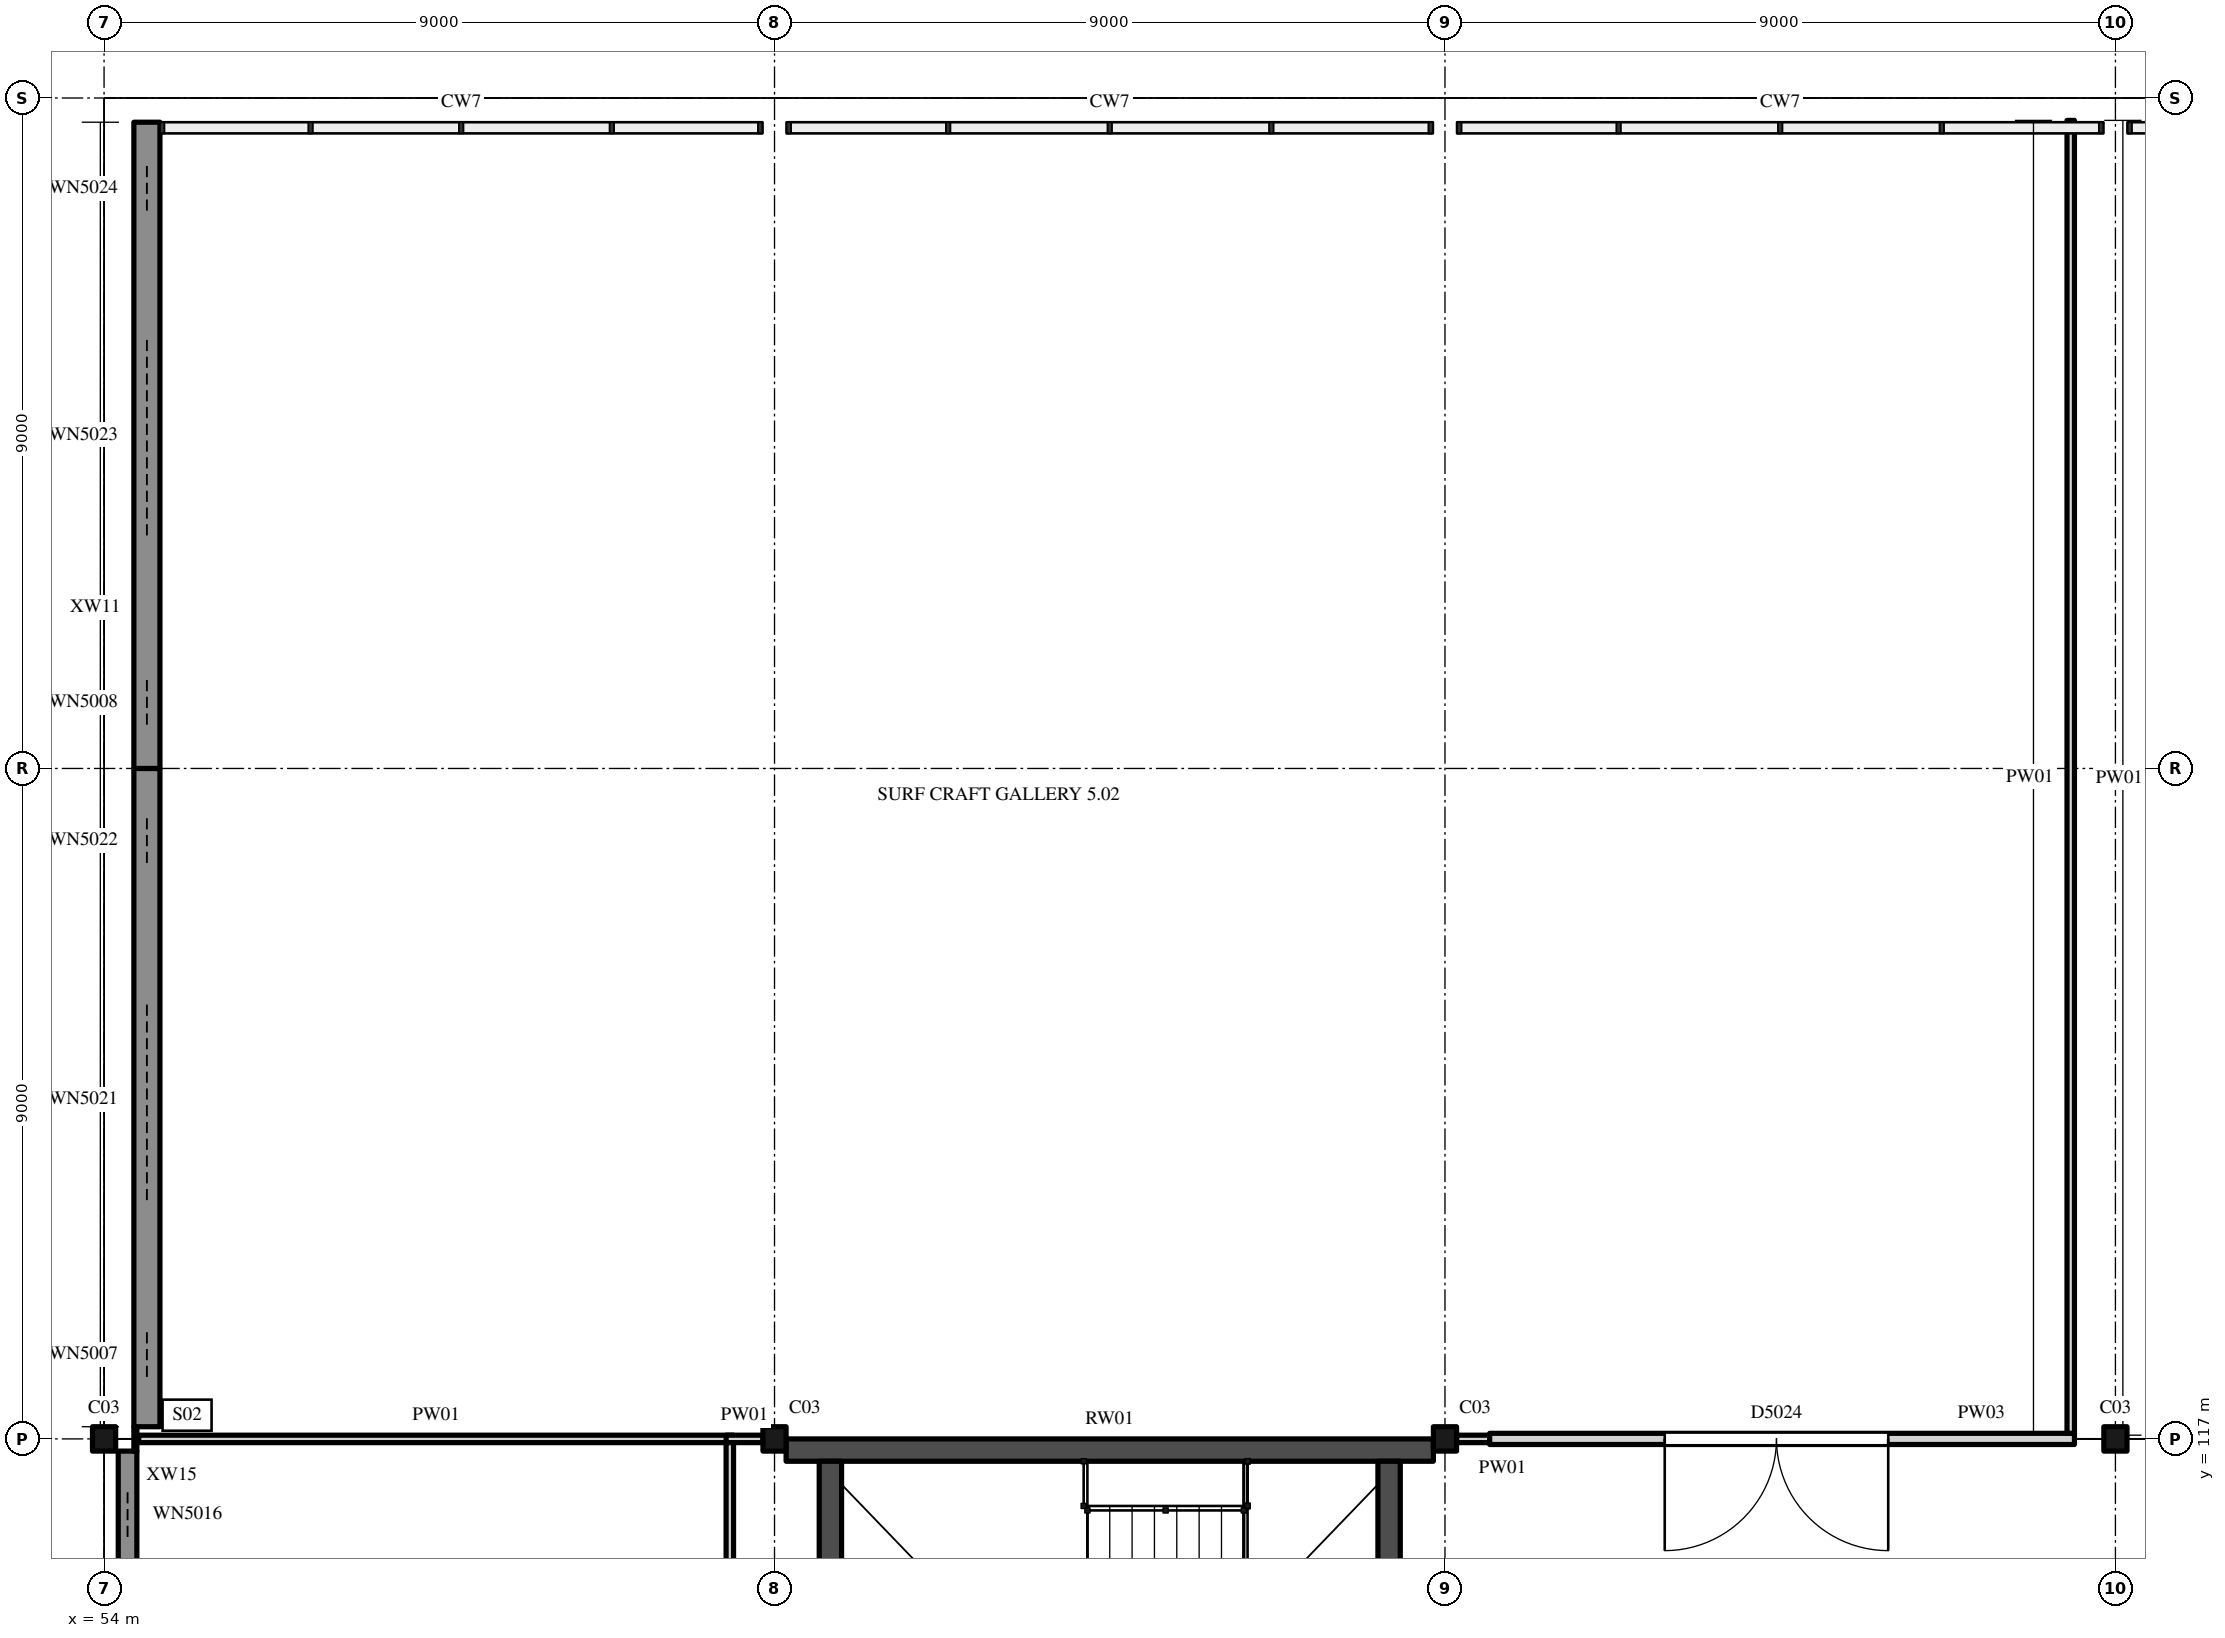
"""IFC4 building model, lengths in metres.
Left out: names, types, materials, properties, quantities, classifications, styles, units other than length and angle.
Written with IfcOpenShell. Run it as: python <this file> out.ifc"""

import sys

from ifc_helpers import new_model, si_unit, direction, frame, frame_2d, origin, origin_2d, place, context, subcontext, project, spatial, rectangle, i_section, extrude, element, fill, save


model = new_model("IFC4")
c1 = context("Model", 3, precision=1e-05, world=origin(), true_north=direction((0.0, 1.0)))
c2 = subcontext(c1, "Body", "Model", "MODEL_VIEW")
j1 = project(units=[si_unit("LENGTHUNIT", "METRE"), si_unit("PLANEANGLEUNIT", "RADIAN")], contexts=[c1])
p1 = place(None, origin())
s1 = spatial("IfcSite", under=j1, at=p1, CompositionType="ELEMENT")
p2 = place(p1, origin())
s2 = spatial("IfcBuilding", under=s1, at=p2, CompositionType="ELEMENT")
p3 = place(p2, frame((0.0, 0.0, 31.0)))
s3 = spatial("IfcBuildingStorey", under=s2, at=p3, CompositionType="ELEMENT", Elevation=31.0)
for number, where, z_axis, x_axis in (
    (1, (54.0, 117.0, 0.0), (0.0, 0.0, 1.0), (1.0, 0.0, 0.0)),
    (2, (63.0, 117.0, 0.0), (0.0, 0.0, 1.0), (1.0, 0.0, 0.0)),
    (3, (72.0, 117.0, 0.0), (0.0, 0.0, 1.0), (1.0, 0.0, 0.0)),
    (4, (81.0, 117.0, 0.0), (0.0, 0.0, 1.0), (1.0, 0.0, 0.0)),
):
    element("IfcColumn", number, at=place(p3, frame(where, z_axis=z_axis, x_axis=x_axis)), inside=s3, PredefinedType="COLUMN", context=c2, shape_type="SweptSolid", body=[
        extrude(i_section(OverallWidth=0.311, OverallDepth=0.327, WebThickness=0.016, FlangeThickness=0.025, FilletRadius=0.017, at=origin_2d()), origin(), (0.0, 0.0, 1.0), 5.0),
    ])
p4 = place(p3, frame((63.156, 116.85, 0.0), z_axis=(0.0, 0.0, 1.0), x_axis=(1.0, 0.0, 0.0)))
e5 = element("IfcWall", 5, at=p4, inside=s3, PredefinedType="SHEAR", context=c2, shape_type="SweptSolid", body=[
    extrude(rectangle(XDim=8.689, YDim=0.3, at=frame_2d((4.344, 0.0))), origin(), (0.0, 0.0, 1.0), 5.0),
])
p5 = place(p3, frame((63.75, 108.9, 0.0), z_axis=(0.0, 0.0, 1.0), x_axis=(0.0, 1.0, 0.0)))
e6 = element("IfcWall", 6, at=p5, inside=s3, PredefinedType="SHEAR", context=c2, shape_type="SweptSolid", body=[
    extrude(rectangle(XDim=7.8, YDim=0.3, at=frame_2d((3.9, 0.0))), origin(), (0.0, 0.0, 1.0), 5.0),
])
p6 = place(p3, frame((71.25, 108.9, 0.0), z_axis=(0.0, 0.0, 1.0), x_axis=(0.0, 1.0, 0.0)))
e7 = element("IfcWall", 7, at=p6, inside=s3, PredefinedType="SHEAR", context=c2, shape_type="SweptSolid", body=[
    extrude(rectangle(XDim=7.8, YDim=0.3, at=frame_2d((3.9, 0.0))), origin(), (0.0, 0.0, 1.0), 5.0),
])
p7 = place(p6, frame((4.1, 0.0, 0.0)))
e8 = element("IfcOpeningElement", 8, at=p7, cuts=e7, PredefinedType="OPENING", context=c2, shape_type="SweptSolid", body=[
    extrude(rectangle(XDim=1.2, YDim=2.1, at=frame_2d((0.6, 1.05))), frame((0.0, 0.16, 0.0), z_axis=(0.0, -1.0, 0.0), x_axis=(1.0, 0.0, 0.0)), (0.0, 0.0, 1.0), 0.32),
])
p8 = place(p3, frame((54.315, 108.161, 0.0), z_axis=(0.0, 0.0, 1.0), x_axis=(0.0, 1.0, 0.0)))
e9 = element("IfcWall", 9, at=p8, inside=s3, PredefinedType="SOLIDWALL", context=c2, shape_type="SweptSolid", body=[
    extrude(rectangle(XDim=8.676, YDim=0.25, at=frame_2d((4.338, 0.0))), origin(), (0.0, 0.0, 1.0), 4.504),
])
p9 = place(p8, frame((0.623, 0.0, 1.6)))
e10 = element("IfcOpeningElement", 10, at=p9, cuts=e9, PredefinedType="OPENING", context=c2, shape_type="SweptSolid", body=[
    extrude(rectangle(XDim=0.6, YDim=1.2, at=frame_2d((0.3, 0.6))), frame((0.0, 0.135, 0.0), z_axis=(0.0, -1.0, 0.0), x_axis=(1.0, 0.0, 0.0)), (0.0, 0.0, 1.0), 0.27),
])
p10 = place(p8, frame((3.017, 0.0, 1.6)))
e11 = element("IfcOpeningElement", 11, at=p10, cuts=e9, PredefinedType="OPENING", context=c2, shape_type="SweptSolid", body=[
    extrude(rectangle(XDim=2.7, YDim=1.2, at=frame_2d((1.35, 0.6))), frame((0.0, 0.135, 0.0), z_axis=(0.0, -1.0, 0.0), x_axis=(1.0, 0.0, 0.0)), (0.0, 0.0, 1.0), 0.27),
])
p11 = place(p8, frame((7.523, 0.0, 1.6)))
e12 = element("IfcOpeningElement", 12, at=p11, cuts=e9, PredefinedType="OPENING", context=c2, shape_type="SweptSolid", body=[
    extrude(rectangle(XDim=0.6, YDim=1.2, at=frame_2d((0.3, 0.6))), frame((0.0, 0.135, 0.0), z_axis=(0.0, -1.0, 0.0), x_axis=(1.0, 0.0, 0.0)), (0.0, 0.0, 1.0), 0.27),
])
p12 = place(p3, frame((54.575, 117.164, 0.0), z_axis=(0.0, 0.0, 1.0), x_axis=(0.0, 1.0, 0.0)))
e13 = element("IfcWall", 13, at=p12, inside=s3, PredefinedType="SOLIDWALL", context=c2, shape_type="SweptSolid", body=[
    extrude(rectangle(XDim=8.836, YDim=0.35, at=frame_2d((4.418, 0.0))), origin(), (0.0, 0.0, 1.0), 4.825),
])
p13 = place(p12, frame((0.668, 0.0, 1.6)))
e14 = element("IfcOpeningElement", 14, at=p13, cuts=e13, PredefinedType="OPENING", context=c2, shape_type="SweptSolid", body=[
    extrude(rectangle(XDim=0.6, YDim=1.2, at=frame_2d((0.3, 0.6))), frame((0.0, 0.185, 0.0), z_axis=(0.0, -1.0, 0.0), x_axis=(1.0, 0.0, 0.0)), (0.0, 0.0, 1.0), 0.37),
])
p14 = place(p12, frame((3.042, 0.0, 1.6)))
e15 = element("IfcOpeningElement", 15, at=p14, cuts=e13, PredefinedType="OPENING", context=c2, shape_type="SweptSolid", body=[
    extrude(rectangle(XDim=2.7, YDim=1.2, at=frame_2d((1.35, 0.6))), frame((0.0, 0.185, 0.0), z_axis=(0.0, -1.0, 0.0), x_axis=(1.0, 0.0, 0.0)), (0.0, 0.0, 1.0), 0.37),
])
p15 = place(p12, frame((7.568, 0.0, 1.6)))
e16 = element("IfcOpeningElement", 16, at=p15, cuts=e13, PredefinedType="OPENING", context=c2, shape_type="SweptSolid", body=[
    extrude(rectangle(XDim=0.6, YDim=1.2, at=frame_2d((0.3, 0.6))), frame((0.0, 0.185, 0.0), z_axis=(0.0, -1.0, 0.0), x_axis=(1.0, 0.0, 0.0)), (0.0, 0.0, 1.0), 0.37),
])
p16 = place(p3, frame((54.575, 126.0, 0.0), z_axis=(0.0, 0.0, 1.0), x_axis=(0.0, 1.0, 0.0)))
e17 = element("IfcWall", 17, at=p16, inside=s3, PredefinedType="SOLIDWALL", context=c2, shape_type="SweptSolid", body=[
    extrude(rectangle(XDim=8.675, YDim=0.35, at=frame_2d((4.337, 0.0))), origin(), (0.0, 0.0, 1.0), 4.825),
])
p17 = place(p16, frame((0.587, 0.0, 1.6)))
e18 = element("IfcOpeningElement", 18, at=p17, cuts=e17, PredefinedType="OPENING", context=c2, shape_type="SweptSolid", body=[
    extrude(rectangle(XDim=0.6, YDim=1.2, at=frame_2d((0.3, 0.6))), frame((0.0, 0.185, 0.0), z_axis=(0.0, -1.0, 0.0), x_axis=(1.0, 0.0, 0.0)), (0.0, 0.0, 1.0), 0.37),
])
p18 = place(p16, frame((3.128, 0.0, 1.6)))
e19 = element("IfcOpeningElement", 19, at=p18, cuts=e17, PredefinedType="OPENING", context=c2, shape_type="SweptSolid", body=[
    extrude(rectangle(XDim=2.7, YDim=1.2, at=frame_2d((1.35, 0.6))), frame((0.0, 0.185, 0.0), z_axis=(0.0, -1.0, 0.0), x_axis=(1.0, 0.0, 0.0)), (0.0, 0.0, 1.0), 0.37),
])
p19 = place(p16, frame((7.488, 0.0, 1.6)))
e20 = element("IfcOpeningElement", 20, at=p19, cuts=e17, PredefinedType="OPENING", context=c2, shape_type="SweptSolid", body=[
    extrude(rectangle(XDim=0.6, YDim=1.2, at=frame_2d((0.3, 0.6))), frame((0.0, 0.185, 0.0), z_axis=(0.0, -1.0, 0.0), x_axis=(1.0, 0.0, 0.0)), (0.0, 0.0, 1.0), 0.37),
])
p20 = place(p3, frame((54.42, 116.836, 0.0), z_axis=(0.0, 0.0, 1.0), x_axis=(0.0, 1.0, 0.0)))
e21 = element("IfcWall", 21, at=p20, inside=s3, PredefinedType="SOLIDWALL", context=c2, shape_type="SweptSolid", body=[
    extrude(rectangle(XDim=0.327, YDim=0.04, at=frame_2d((0.164, 0.0))), origin(), (0.0, 0.0, 1.0), 4.825),
])
p21 = place(p3, frame((54.465, 117.0, 0.0), z_axis=(0.0, 0.0, 1.0), x_axis=(1.0, 0.0, 0.0)))
e22 = element("IfcWall", 22, at=p21, inside=s3, PredefinedType="PARTITIONING", context=c2, shape_type="SweptSolid", body=[
    extrude(rectangle(XDim=7.985, YDim=0.1, at=frame_2d((3.992, 0.0))), origin(), (0.0, 0.0, 1.0), 4.518),
])
p22 = place(p3, frame((62.351, 117.0, 0.0), z_axis=(0.0, 0.0, 1.0), x_axis=(1.0, 0.0, 0.0)))
e23 = element("IfcWall", 23, at=p22, inside=s3, PredefinedType="PARTITIONING", context=c2, shape_type="SweptSolid", body=[
    extrude(rectangle(XDim=0.494, YDim=0.1, at=frame_2d((0.247, 0.0))), origin(), (0.0, 0.0, 1.0), 4.825),
])
p23 = place(p3, frame((72.156, 117.0, 0.0), z_axis=(0.0, 0.0, 1.0), x_axis=(1.0, 0.0, 0.0)))
e24 = element("IfcWall", 24, at=p23, inside=s3, PredefinedType="PARTITIONING", context=c2, shape_type="SweptSolid", body=[
    extrude(rectangle(XDim=0.444, YDim=0.1, at=frame_2d((0.222, 0.0))), origin(), (0.0, 0.0, 1.0), 4.825),
])
p24 = place(p3, frame((72.6, 117.0, 0.0), z_axis=(0.0, 0.0, 1.0), x_axis=(1.0, 0.0, 0.0)))
e25 = element("IfcWall", 25, at=p24, inside=s3, PredefinedType="PARTITIONING", context=c2, shape_type="SweptSolid", body=[
    extrude(rectangle(XDim=7.85, YDim=0.15, at=frame_2d((3.925, 0.0))), origin(), (0.0, 0.0, 1.0), 4.518),
])
p25 = place(p24, frame((2.35, 0.0, 0.0)))
e26 = element("IfcOpeningElement", 26, at=p25, cuts=e25, PredefinedType="OPENING", context=c2, shape_type="SweptSolid", body=[
    extrude(rectangle(XDim=3.0, YDim=3.0, at=frame_2d((1.5, 1.5))), frame((0.0, 0.085, 0.0), z_axis=(0.0, -1.0, 0.0), x_axis=(1.0, 0.0, 0.0)), (0.0, 0.0, 1.0), 0.17),
])
p26 = place(p3, frame((62.4, 108.062, 0.0), z_axis=(0.0, 0.0, 1.0), x_axis=(0.0, 1.0, 0.0)))
e27 = element("IfcWall", 27, at=p26, inside=s3, PredefinedType="PARTITIONING", context=c2, shape_type="SweptSolid", body=[
    extrude(rectangle(XDim=8.887, YDim=0.1, at=frame_2d((4.444, 0.0))), origin(), (0.0, 0.0, 1.0), 4.825),
])
p27 = place(p3, frame((80.4, 117.075, 0.0), z_axis=(0.0, 0.0, 1.0), x_axis=(0.0, 1.0, 0.0)))
e28 = element("IfcWall", 28, at=p27, inside=s3, PredefinedType="PARTITIONING", context=c2, shape_type="SweptSolid", body=[
    extrude(rectangle(XDim=17.625, YDim=0.1, at=frame_2d((8.812, 0.0))), origin(), (0.0, 0.0, 1.0), 4.825),
])
p28 = place(p11, origin())
e29 = element("IfcWindow", 29, at=p28, inside=s3, PartitioningType="SINGLE_PANEL", PredefinedType="WINDOW", context=c2, shape_type="SweptSolid", body=[
    extrude(rectangle(XDim=0.6, YDim=1.2, at=frame_2d((0.3, 0.6))), frame((0.0, 0.03, 0.0), z_axis=(0.0, -1.0, 0.0), x_axis=(1.0, 0.0, 0.0)), (0.0, 0.0, 1.0), 0.06),
])
fill(e12, e29)
p29 = place(p13, origin())
e30 = element("IfcWindow", 30, at=p29, inside=s3, PartitioningType="SINGLE_PANEL", PredefinedType="WINDOW", context=c2, shape_type="SweptSolid", body=[
    extrude(rectangle(XDim=0.6, YDim=1.2, at=frame_2d((0.3, 0.6))), frame((0.0, 0.03, 0.0), z_axis=(0.0, -1.0, 0.0), x_axis=(1.0, 0.0, 0.0)), (0.0, 0.0, 1.0), 0.06),
])
fill(e14, e30)
p30 = place(p14, origin())
e31 = element("IfcWindow", 31, at=p30, inside=s3, PartitioningType="SINGLE_PANEL", PredefinedType="WINDOW", context=c2, shape_type="SweptSolid", body=[
    extrude(rectangle(XDim=2.7, YDim=1.2, at=frame_2d((1.35, 0.6))), frame((0.0, 0.03, 0.0), z_axis=(0.0, -1.0, 0.0), x_axis=(1.0, 0.0, 0.0)), (0.0, 0.0, 1.0), 0.06),
])
fill(e15, e31)
p31 = place(p15, origin())
e32 = element("IfcWindow", 32, at=p31, inside=s3, PartitioningType="SINGLE_PANEL", PredefinedType="WINDOW", context=c2, shape_type="SweptSolid", body=[
    extrude(rectangle(XDim=0.6, YDim=1.2, at=frame_2d((0.3, 0.6))), frame((0.0, 0.03, 0.0), z_axis=(0.0, -1.0, 0.0), x_axis=(1.0, 0.0, 0.0)), (0.0, 0.0, 1.0), 0.06),
])
fill(e16, e32)
p32 = place(p17, origin())
e33 = element("IfcWindow", 33, at=p32, inside=s3, PartitioningType="SINGLE_PANEL", PredefinedType="WINDOW", context=c2, shape_type="SweptSolid", body=[
    extrude(rectangle(XDim=0.6, YDim=1.2, at=frame_2d((0.3, 0.6))), frame((0.0, 0.03, 0.0), z_axis=(0.0, -1.0, 0.0), x_axis=(1.0, 0.0, 0.0)), (0.0, 0.0, 1.0), 0.06),
])
fill(e18, e33)
p33 = place(p18, origin())
e34 = element("IfcWindow", 34, at=p33, inside=s3, PartitioningType="SINGLE_PANEL", PredefinedType="WINDOW", context=c2, shape_type="SweptSolid", body=[
    extrude(rectangle(XDim=2.7, YDim=1.2, at=frame_2d((1.35, 0.6))), frame((0.0, 0.03, 0.0), z_axis=(0.0, -1.0, 0.0), x_axis=(1.0, 0.0, 0.0)), (0.0, 0.0, 1.0), 0.06),
])
fill(e19, e34)
p34 = place(p19, origin())
e35 = element("IfcWindow", 35, at=p34, inside=s3, PartitioningType="SINGLE_PANEL", PredefinedType="WINDOW", context=c2, shape_type="SweptSolid", body=[
    extrude(rectangle(XDim=0.6, YDim=1.2, at=frame_2d((0.3, 0.6))), frame((0.0, 0.03, 0.0), z_axis=(0.0, -1.0, 0.0), x_axis=(1.0, 0.0, 0.0)), (0.0, 0.0, 1.0), 0.06),
])
fill(e20, e35)
p35 = place(p25, origin())
e36 = element("IfcDoor", 36, at=p35, inside=s3, OperationType="DOUBLE_DOOR_SINGLE_SWING", PredefinedType="DOOR", context=c2, shape_type="SweptSolid", body=[
    extrude(rectangle(XDim=3.0, YDim=3.0, at=frame_2d((1.5, 1.5))), frame((0.0, 0.025, 0.0), z_axis=(0.0, -1.0, 0.0), x_axis=(1.0, 0.0, 0.0)), (0.0, 0.0, 1.0), 0.05),
])
fill(e26, e36)
save(model, sys.argv[1])
